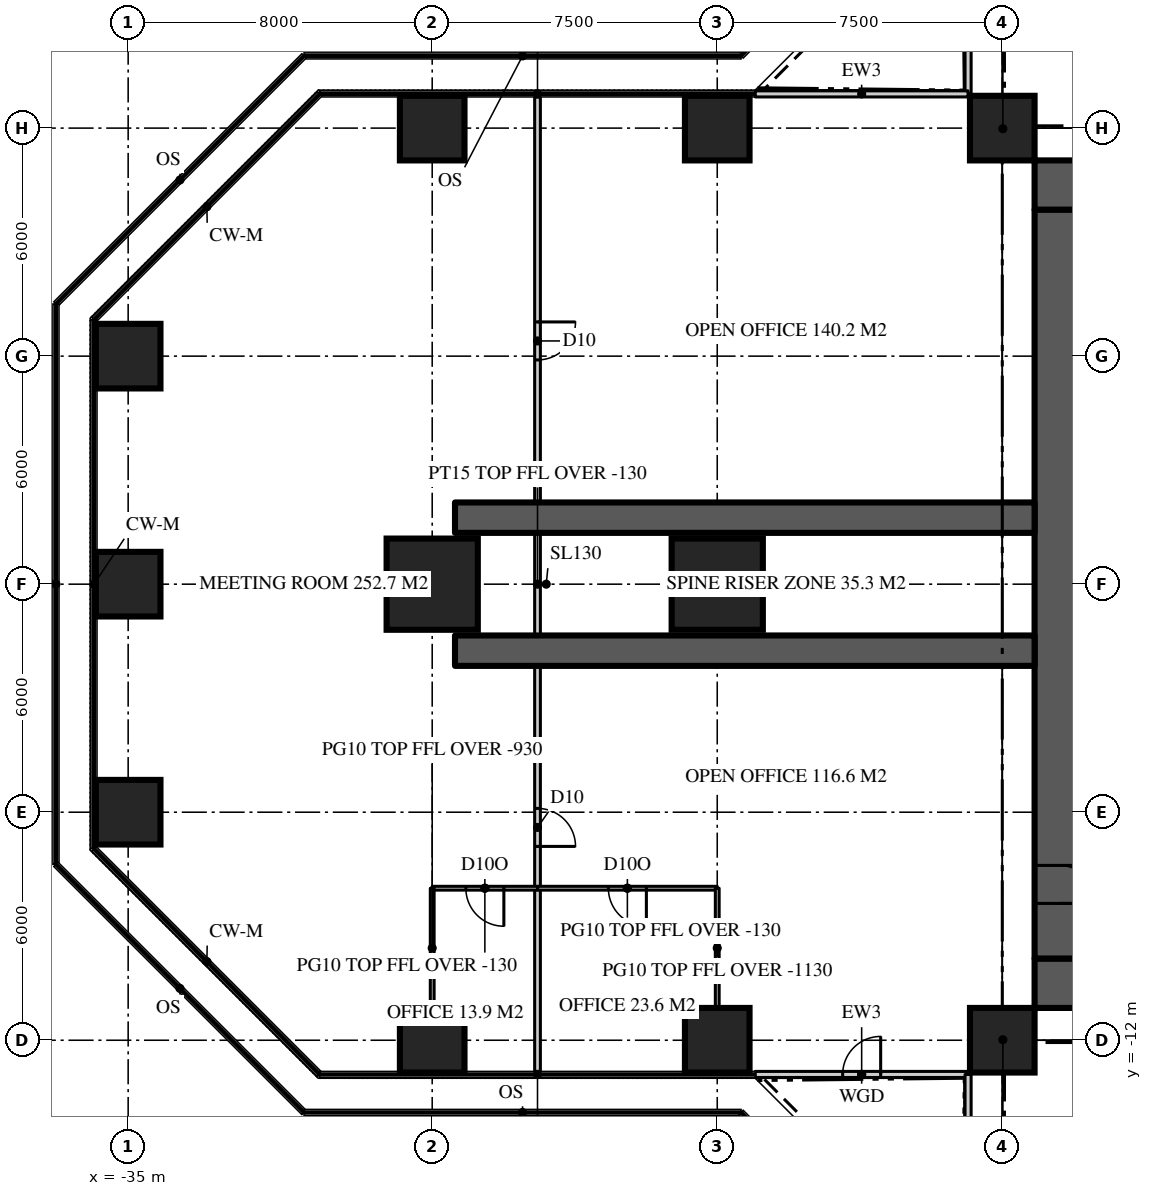
"""IFC4 building model, lengths in metres.
Left out: names, types, materials, properties, quantities, classifications, styles, units other than length and angle.
Written with IfcOpenShell. Run it as: python <this file> out.ifc"""

import sys

from ifc_helpers import new_model, si_unit, direction, frame, frame_2d, origin, origin_2d, place, context, subcontext, project, spatial, rectangle, extrude, element, fill, save


model = new_model("IFC4")
c1 = context("Model", 3, precision=1e-05, world=origin(), true_north=direction((0.0, 1.0)))
c2 = subcontext(c1, "Body", "Model", "MODEL_VIEW")
j1 = project(units=[si_unit("LENGTHUNIT", "METRE"), si_unit("PLANEANGLEUNIT", "RADIAN")], contexts=[c1])
p1 = place(None, origin())
s1 = spatial("IfcSite", under=j1, at=p1, CompositionType="ELEMENT")
p2 = place(p1, origin())
s2 = spatial("IfcBuilding", under=s1, at=p2, CompositionType="ELEMENT")
p3 = place(p2, frame((0.0, 0.0, 186.6)))
s3 = spatial("IfcBuildingStorey", under=s2, at=p3, CompositionType="ELEMENT", Elevation=186.6)
p4 = place(p3, frame((-11.15, 10.5, 0.0), z_axis=(0.0, 0.0, 1.0), x_axis=(1.0, 0.0, 0.0)))
e1 = element("IfcWall", 1, at=p4, inside=s3, PredefinedType="SHEAR", context=c2, shape_type="SweptSolid", body=[
    extrude(rectangle(XDim=22.3, YDim=1.3, at=frame_2d((11.15, 0.0))), origin(), (0.0, 0.0, 1.0), 3.9),
])
p5 = place(p4, frame((4.25, 0.0, 0.0)))
e2 = element("IfcOpeningElement", 2, at=p5, cuts=e1, PredefinedType="OPENING", context=c2, shape_type="SweptSolid", body=[
    extrude(rectangle(XDim=1.8, YDim=2.2, at=frame_2d((0.9, 1.1))), frame((0.0, 0.66, 0.0), z_axis=(0.0, -1.0, 0.0), x_axis=(1.0, 0.0, 0.0)), (0.0, 0.0, 1.0), 1.32),
])
p6 = place(p4, frame((16.25, 0.0, 0.0)))
e3 = element("IfcOpeningElement", 3, at=p6, cuts=e1, PredefinedType="OPENING", context=c2, shape_type="SweptSolid", body=[
    extrude(rectangle(XDim=1.8, YDim=2.2, at=frame_2d((0.9, 1.1))), frame((0.0, 0.66, 0.0), z_axis=(0.0, -1.0, 0.0), x_axis=(1.0, 0.0, 0.0)), (0.0, 0.0, 1.0), 1.32),
])
p7 = place(p3, frame((11.15, -10.5, 0.0), z_axis=(0.0, 0.0, 1.0), x_axis=(-1.0, 0.0, 0.0)))
e4 = element("IfcWall", 4, at=p7, inside=s3, PredefinedType="SHEAR", context=c2, shape_type="SweptSolid", body=[
    extrude(rectangle(XDim=22.3, YDim=1.3, at=frame_2d((11.15, 0.0))), origin(), (0.0, 0.0, 1.0), 3.9),
])
p8 = place(p7, frame((16.25, 0.0, 0.0)))
e5 = element("IfcOpeningElement", 5, at=p8, cuts=e4, PredefinedType="OPENING", context=c2, shape_type="SweptSolid", body=[
    extrude(rectangle(XDim=1.8, YDim=2.2, at=frame_2d((0.9, 1.1))), frame((0.0, 0.66, 0.0), z_axis=(0.0, -1.0, 0.0), x_axis=(1.0, 0.0, 0.0)), (0.0, 0.0, 1.0), 1.32),
])
p9 = place(p7, frame((4.25, 0.0, 0.0)))
e6 = element("IfcOpeningElement", 6, at=p9, cuts=e4, PredefinedType="OPENING", context=c2, shape_type="SweptSolid", body=[
    extrude(rectangle(XDim=1.8, YDim=2.2, at=frame_2d((0.9, 1.1))), frame((0.0, 0.66, 0.0), z_axis=(0.0, -1.0, 0.0), x_axis=(1.0, 0.0, 0.0)), (0.0, 0.0, 1.0), 1.32),
])
p10 = place(p3, frame((-10.5, 9.85, 0.0), z_axis=(0.0, 0.0, 1.0), x_axis=(0.0, -1.0, 0.0)))
e7 = element("IfcWall", 7, at=p10, inside=s3, PredefinedType="SHEAR", context=c2, shape_type="SweptSolid", body=[
    extrude(rectangle(XDim=19.7, YDim=1.3, at=frame_2d((9.85, 0.0))), origin(), (0.0, 0.0, 1.0), 3.9),
])
p11 = place(p10, frame((17.25, 0.0, 0.0)))
e8 = element("IfcOpeningElement", 8, at=p11, cuts=e7, PredefinedType="OPENING", context=c2, shape_type="SweptSolid", body=[
    extrude(rectangle(XDim=1.0, YDim=2.2, at=frame_2d((0.5, 1.1))), frame((0.0, 0.66, 0.0), z_axis=(0.0, -1.0, 0.0), x_axis=(1.0, 0.0, 0.0)), (0.0, 0.0, 1.0), 1.32),
])
for number, where, z_axis, x_axis in (
    (9, (-11.15, 1.75, 0.0), (0.0, 0.0, 1.0), (-1.0, 0.0, 0.0)),
    (10, (-11.15, -1.75, 0.0), (0.0, 0.0, 1.0), (-1.0, 0.0, 0.0)),
):
    element("IfcWall", number, at=place(p3, frame(where, z_axis=z_axis, x_axis=x_axis)), inside=s3, PredefinedType="SHEAR", context=c2, shape_type="SweptSolid", body=[
        extrude(rectangle(XDim=15.25, YDim=0.8, at=frame_2d((7.625, 0.0))), origin(), (0.0, 0.0, 1.0), 3.9),
    ])
for number, where, z_axis, x_axis in (
    (11, (-27.0, -12.0, 0.0), (0.0, 0.0, 1.0), (1.0, 0.0, 0.0)),
    (12, (-19.5, -12.0, 0.0), (0.0, 0.0, 1.0), (1.0, 0.0, 0.0)),
    (13, (-12.0, -12.0, 0.0), (0.0, 0.0, 1.0), (1.0, 0.0, 0.0)),
    (14, (-35.0, -6.0, 0.0), (0.0, 0.0, 1.0), (1.0, 0.0, 0.0)),
    (15, (-35.0, 0.0, 0.0), (0.0, 0.0, 1.0), (1.0, 0.0, 0.0)),
):
    element("IfcColumn", number, at=place(p3, frame(where, z_axis=z_axis, x_axis=x_axis)), inside=s3, PredefinedType="COLUMN", context=c2, shape_type="SweptSolid", body=[
        extrude(rectangle(XDim=1.7, YDim=1.7, at=origin_2d()), origin(), (0.0, 0.0, 1.0), 3.9),
    ])
for number, where, z_axis, x_axis in (
    (16, (-27.0, 0.0, 0.0), (0.0, 0.0, 1.0), (1.0, 0.0, 0.0)),
    (17, (-19.5, 0.0, 0.0), (0.0, 0.0, 1.0), (1.0, 0.0, 0.0)),
):
    element("IfcColumn", number, at=place(p3, frame(where, z_axis=z_axis, x_axis=x_axis)), inside=s3, PredefinedType="COLUMN", context=c2, shape_type="SweptSolid", body=[
        extrude(rectangle(XDim=2.4, YDim=2.4, at=origin_2d()), origin(), (0.0, 0.0, 1.0), 3.9),
    ])
for number, where, z_axis, x_axis in (
    (18, (-35.0, 6.0, 0.0), (0.0, 0.0, 1.0), (1.0, 0.0, 0.0)),
    (19, (-27.0, 12.0, 0.0), (0.0, 0.0, 1.0), (1.0, 0.0, 0.0)),
    (20, (-19.5, 12.0, 0.0), (0.0, 0.0, 1.0), (1.0, 0.0, 0.0)),
    (21, (-12.0, 12.0, 0.0), (0.0, 0.0, 1.0), (1.0, 0.0, 0.0)),
):
    element("IfcColumn", number, at=place(p3, frame(where, z_axis=z_axis, x_axis=x_axis)), inside=s3, PredefinedType="COLUMN", context=c2, shape_type="SweptSolid", body=[
        extrude(rectangle(XDim=1.7, YDim=1.7, at=origin_2d()), origin(), (0.0, 0.0, 1.0), 3.9),
    ])
p12 = place(p3, frame((-12.9, 18.5, 0.0), z_axis=(0.0, 0.0, 1.0), x_axis=(0.0, -1.0, 0.0)))
e22 = element("IfcWall", 22, at=p12, inside=s3, PredefinedType="SOLIDWALL", context=c2, shape_type="SweptSolid", body=[
    extrude(rectangle(XDim=5.6, YDim=0.16, at=frame_2d((2.8, 0.0))), origin(), (0.0, 0.0, 1.0), 3.77),
])
p13 = place(p12, frame((2.3, 0.0, 0.0)))
e23 = element("IfcOpeningElement", 23, at=p13, cuts=e22, PredefinedType="OPENING", context=c2, shape_type="SweptSolid", body=[
    extrude(rectangle(XDim=1.0, YDim=2.2, at=frame_2d((0.5, 1.1))), frame((0.0, 0.09, 0.0), z_axis=(0.0, -1.0, 0.0), x_axis=(1.0, 0.0, 0.0)), (0.0, 0.0, 1.0), 0.18),
])
p14 = place(p3, frame((-12.9, 12.9, 0.0), z_axis=(0.0, 0.0, 1.0), x_axis=(-1.0, 0.0, 0.0)))
e24 = element("IfcWall", 24, at=p14, inside=s3, PredefinedType="SOLIDWALL", context=c2, shape_type="SweptSolid", body=[
    extrude(rectangle(XDim=5.6, YDim=0.16, at=frame_2d((2.8, 0.0))), origin(), (0.0, 0.0, 1.0), 3.77),
])
p15 = place(p3, frame((-18.5, -12.9, 0.0), z_axis=(0.0, 0.0, 1.0), x_axis=(1.0, 0.0, 0.0)))
e25 = element("IfcWall", 25, at=p15, inside=s3, PredefinedType="SOLIDWALL", context=c2, shape_type="SweptSolid", body=[
    extrude(rectangle(XDim=5.6, YDim=0.16, at=frame_2d((2.8, 0.0))), origin(), (0.0, 0.0, 1.0), 3.77),
])
p16 = place(p15, frame((2.3, 0.0, 0.0)))
e26 = element("IfcOpeningElement", 26, at=p16, cuts=e25, PredefinedType="OPENING", context=c2, shape_type="SweptSolid", body=[
    extrude(rectangle(XDim=1.0, YDim=2.2, at=frame_2d((0.5, 1.1))), frame((0.0, 0.09, 0.0), z_axis=(0.0, -1.0, 0.0), x_axis=(1.0, 0.0, 0.0)), (0.0, 0.0, 1.0), 0.18),
])
p17 = place(p3, frame((-12.9, -12.9, 0.0), z_axis=(0.0, 0.0, 1.0), x_axis=(0.0, -1.0, 0.0)))
e27 = element("IfcWall", 27, at=p17, inside=s3, PredefinedType="SOLIDWALL", context=c2, shape_type="SweptSolid", body=[
    extrude(rectangle(XDim=5.6, YDim=0.16, at=frame_2d((2.8, 0.0))), origin(), (0.0, 0.0, 1.0), 3.77),
])
p18 = place(p3, frame((-24.229, 12.82, 0.0), z_axis=(0.0, 0.0, 1.0), x_axis=(0.0, -1.0, 0.0)))
e28 = element("IfcWall", 28, at=p18, inside=s3, PredefinedType="PARTITIONING", context=c2, shape_type="SweptSolid", body=[
    extrude(rectangle(XDim=25.64, YDim=0.15, at=frame_2d((12.82, 0.0))), origin(), (0.0, 0.0, 1.0), 3.77),
])
p19 = place(p18, frame((18.72, 0.0, 0.0)))
e29 = element("IfcOpeningElement", 29, at=p19, cuts=e28, PredefinedType="OPENING", context=c2, shape_type="SweptSolid", body=[
    extrude(rectangle(XDim=1.0, YDim=2.2, at=frame_2d((0.5, 1.1))), frame((0.0, 0.085, 0.0), z_axis=(0.0, -1.0, 0.0), x_axis=(1.0, 0.0, 0.0)), (0.0, 0.0, 1.0), 0.17),
])
p20 = place(p18, frame((5.92, 0.0, 0.0)))
e30 = element("IfcOpeningElement", 30, at=p20, cuts=e28, PredefinedType="OPENING", context=c2, shape_type="SweptSolid", body=[
    extrude(rectangle(XDim=1.0, YDim=2.2, at=frame_2d((0.5, 1.1))), frame((0.0, 0.085, 0.0), z_axis=(0.0, -1.0, 0.0), x_axis=(1.0, 0.0, 0.0)), (0.0, 0.0, 1.0), 0.17),
])
p21 = place(p3, frame((-19.5, -8.0, 0.0), z_axis=(0.0, 0.0, 1.0), x_axis=(-1.0, 0.0, 0.0)))
e31 = element("IfcWall", 31, at=p21, inside=s3, PredefinedType="PARTITIONING", context=c2, shape_type="SweptSolid", body=[
    extrude(rectangle(XDim=4.729, YDim=0.1, at=frame_2d((2.365, 0.0))), origin(), (0.0, 0.0, 1.0), 3.77),
])
p22 = place(p21, frame((1.865, 0.0, 0.0)))
e32 = element("IfcOpeningElement", 32, at=p22, cuts=e31, PredefinedType="OPENING", context=c2, shape_type="SweptSolid", body=[
    extrude(rectangle(XDim=1.0, YDim=2.2, at=frame_2d((0.5, 1.1))), frame((0.0, 0.06, 0.0), z_axis=(0.0, -1.0, 0.0), x_axis=(1.0, 0.0, 0.0)), (0.0, 0.0, 1.0), 0.12),
])
p23 = place(p3, frame((-24.229, -8.0, 0.0), z_axis=(0.0, 0.0, 1.0), x_axis=(-1.0, 0.0, 0.0)))
e33 = element("IfcWall", 33, at=p23, inside=s3, PredefinedType="PARTITIONING", context=c2, shape_type="SweptSolid", body=[
    extrude(rectangle(XDim=2.771, YDim=0.1, at=frame_2d((1.385, 0.0))), origin(), (0.0, 0.0, 1.0), 3.77),
])
p24 = place(p23, frame((0.885, 0.0, 0.0)))
e34 = element("IfcOpeningElement", 34, at=p24, cuts=e33, PredefinedType="OPENING", context=c2, shape_type="SweptSolid", body=[
    extrude(rectangle(XDim=1.0, YDim=2.2, at=frame_2d((0.5, 1.1))), frame((0.0, 0.06, 0.0), z_axis=(0.0, -1.0, 0.0), x_axis=(1.0, 0.0, 0.0)), (0.0, 0.0, 1.0), 0.12),
])
p25 = place(p3, frame((-19.5, -8.0, 0.0), z_axis=(0.0, 0.0, 1.0), x_axis=(0.0, -1.0, 0.0)))
e35 = element("IfcWall", 35, at=p25, inside=s3, PredefinedType="PARTITIONING", context=c2, shape_type="SweptSolid", body=[
    extrude(rectangle(XDim=3.15, YDim=0.1, at=frame_2d((1.575, 0.0))), origin(), (0.0, 0.0, 1.0), 2.77),
])
p26 = place(p3, frame((-27.0, -8.0, 0.0), z_axis=(0.0, 0.0, 1.0), x_axis=(0.0, -1.0, 0.0)))
e36 = element("IfcWall", 36, at=p26, inside=s3, PredefinedType="PARTITIONING", context=c2, shape_type="SweptSolid", body=[
    extrude(rectangle(XDim=3.15, YDim=0.1, at=frame_2d((1.575, 0.0))), origin(), (0.0, 0.0, 1.0), 2.97),
])
for number, where, z_axis, x_axis in (
    (37, (-11.15, 11.15, 0.0), (0.0, 0.0, 1.0), (-0.707, 0.707, 0.0)),
    (38, (-11.15, -11.15, 0.0), (0.0, 0.0, 1.0), (-0.707, -0.707, 0.0)),
):
    element("IfcWall", number, at=place(p3, frame(where, z_axis=z_axis, x_axis=x_axis)), inside=s3, PredefinedType="PARTITIONING", context=c2, shape_type="SweptSolid", body=[
        extrude(rectangle(XDim=2.362, YDim=0.15, at=frame_2d((1.181, 0.0))), origin(), (0.0, 0.0, 1.0), 3.22),
    ])
p27 = place(p16, origin())
e39 = element("IfcDoor", 39, at=p27, inside=s3, OperationType="SINGLE_SWING_RIGHT", PredefinedType="DOOR", context=c2, shape_type="SweptSolid", body=[
    extrude(rectangle(XDim=1.0, YDim=2.2, at=frame_2d((0.5, 1.1))), frame((0.0, 0.025, 0.0), z_axis=(0.0, -1.0, 0.0), x_axis=(1.0, 0.0, 0.0)), (0.0, 0.0, 1.0), 0.05),
])
fill(e26, e39)
p28 = place(p11, origin())
e40 = element("IfcDoor", 40, at=p28, inside=s3, OperationType="SINGLE_SWING_RIGHT", PredefinedType="DOOR", context=c2, shape_type="SweptSolid", body=[
    extrude(rectangle(XDim=1.0, YDim=2.2, at=frame_2d((0.5, 1.1))), frame((0.0, 0.025, 0.0), z_axis=(0.0, -1.0, 0.0), x_axis=(1.0, 0.0, 0.0)), (0.0, 0.0, 1.0), 0.05),
])
fill(e8, e40)
p29 = place(p19, origin())
e41 = element("IfcDoor", 41, at=p29, inside=s3, OperationType="SINGLE_SWING_RIGHT", PredefinedType="DOOR", context=c2, shape_type="SweptSolid", body=[
    extrude(rectangle(XDim=1.0, YDim=2.2, at=frame_2d((0.5, 1.1))), frame((0.0, 0.025, 0.0), z_axis=(0.0, -1.0, 0.0), x_axis=(1.0, 0.0, 0.0)), (0.0, 0.0, 1.0), 0.05),
])
fill(e29, e41)
p30 = place(p20, origin())
e42 = element("IfcDoor", 42, at=p30, inside=s3, OperationType="SINGLE_SWING_LEFT", PredefinedType="DOOR", context=c2, shape_type="SweptSolid", body=[
    extrude(rectangle(XDim=1.0, YDim=2.2, at=frame_2d((0.5, 1.1))), frame((0.0, 0.025, 0.0), z_axis=(0.0, -1.0, 0.0), x_axis=(1.0, 0.0, 0.0)), (0.0, 0.0, 1.0), 0.05),
])
fill(e30, e42)
p31 = place(p22, origin())
e43 = element("IfcDoor", 43, at=p31, inside=s3, OperationType="SINGLE_SWING_LEFT", PredefinedType="DOOR", context=c2, shape_type="SweptSolid", body=[
    extrude(rectangle(XDim=1.0, YDim=2.2, at=frame_2d((0.5, 1.1))), frame((0.0, 0.025, 0.0), z_axis=(0.0, -1.0, 0.0), x_axis=(1.0, 0.0, 0.0)), (0.0, 0.0, 1.0), 0.05),
])
fill(e32, e43)
p32 = place(p24, origin())
e44 = element("IfcDoor", 44, at=p32, inside=s3, OperationType="SINGLE_SWING_LEFT", PredefinedType="DOOR", context=c2, shape_type="SweptSolid", body=[
    extrude(rectangle(XDim=1.0, YDim=2.2, at=frame_2d((0.5, 1.1))), frame((0.0, 0.025, 0.0), z_axis=(0.0, -1.0, 0.0), x_axis=(1.0, 0.0, 0.0)), (0.0, 0.0, 1.0), 0.05),
])
fill(e34, e44)
save(model, sys.argv[1])
